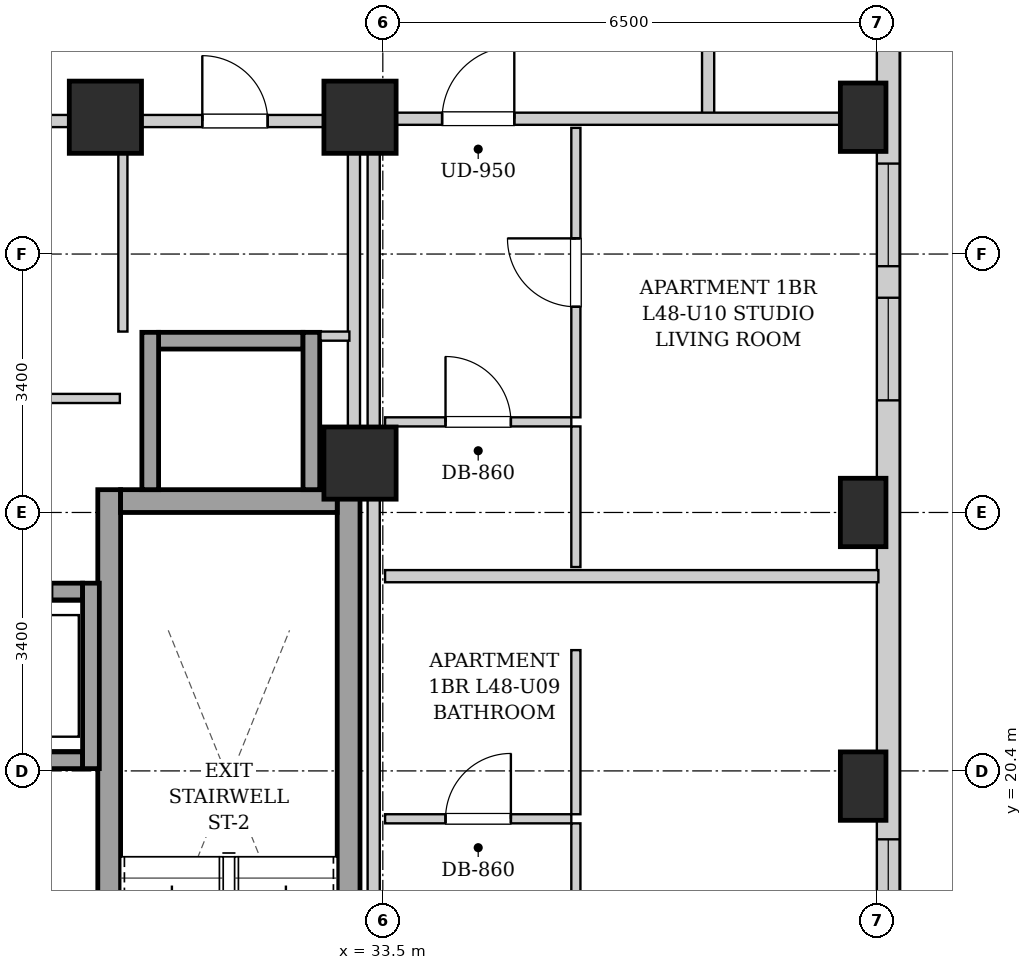
"""IFC4 building model, lengths in metres.
Left out: names, types, materials, properties, quantities, classifications, styles, units other than length and angle.
Written with IfcOpenShell. Run it as: python <this file> out.ifc"""

import sys

from ifc_helpers import new_model, si_unit, direction, frame, frame_2d, origin, origin_2d, place, context, subcontext, project, spatial, rectangle, extrude, element, fill, save


model = new_model("IFC4")
c1 = context("Model", 3, precision=1e-05, world=origin(), true_north=direction((0.0, 1.0)))
c2 = subcontext(c1, "Body", "Model", "MODEL_VIEW")
j1 = project(units=[si_unit("LENGTHUNIT", "METRE"), si_unit("PLANEANGLEUNIT", "RADIAN")], contexts=[c1])
p1 = place(None, origin())
s1 = spatial("IfcSite", under=j1, at=p1, CompositionType="ELEMENT")
p2 = place(p1, origin())
s2 = spatial("IfcBuilding", under=s1, at=p2, CompositionType="ELEMENT")
p3 = place(p2, frame((0.0, 0.0, 166.65)))
s3 = spatial("IfcBuildingStorey", under=s2, at=p3, CompositionType="ELEMENT", Elevation=166.65)
for number, where, z_axis, x_axis in (
    (1, (39.82, 20.2, 0.0), (0.0, 0.0, 1.0), (1.0, 0.0, 0.0)),
    (2, (39.82, 23.8, 0.0), (0.0, 0.0, 1.0), (1.0, 0.0, 0.0)),
    (3, (39.82, 29.0, 0.0), (0.0, 0.0, 1.0), (1.0, 0.0, 0.0)),
):
    element("IfcColumn", number, at=place(p3, frame(where, z_axis=z_axis, x_axis=x_axis)), inside=s3, PredefinedType="COLUMN", context=c2, shape_type="SweptSolid", body=[
        extrude(rectangle(XDim=0.6, YDim=0.9, at=origin_2d()), origin(), (0.0, 0.0, 1.0), 3.25),
    ])
for number, where, z_axis, x_axis in (
    (4, (29.85, 29.0, 0.0), (0.0, 0.0, 1.0), (1.0, 0.0, 0.0)),
    (5, (33.2, 29.0, 0.0), (0.0, 0.0, 1.0), (1.0, 0.0, 0.0)),
    (6, (33.2, 24.45, 0.0), (0.0, 0.0, 1.0), (1.0, 0.0, 0.0)),
):
    element("IfcColumn", number, at=place(p3, frame(where, z_axis=z_axis, x_axis=x_axis)), inside=s3, PredefinedType="COLUMN", context=c2, shape_type="SweptSolid", body=[
        extrude(rectangle(XDim=0.95, YDim=0.95, at=origin_2d()), origin(), (0.0, 0.0, 1.0), 3.25),
    ])
p4 = place(p3, frame((40.15, 40.8, 0.0), z_axis=(0.0, 0.0, 1.0), x_axis=(0.0, -1.0, 0.0)))
e7 = element("IfcWall", 7, at=p4, inside=s3, PredefinedType="SOLIDWALL", context=c2, shape_type="SweptSolid", body=[
    extrude(rectangle(XDim=34.5, YDim=0.3, at=frame_2d((17.25, 0.0))), origin(), (0.0, 0.0, 1.0), 2.93),
])
p5 = place(p4, frame((31.725, 0.0, 0.55)))
e8 = element("IfcOpeningElement", 8, at=p5, cuts=e7, PredefinedType="OPENING", context=c2, shape_type="SweptSolid", body=[
    extrude(rectangle(XDim=1.35, YDim=1.2, at=frame_2d((0.675, 0.6))), frame((0.0, 0.16, 0.0), z_axis=(0.0, -1.0, 0.0), x_axis=(1.0, 0.0, 0.0)), (0.0, 0.0, 1.0), 0.32),
])
p6 = place(p4, frame((3.0, 0.0, 0.55)))
e9 = element("IfcOpeningElement", 9, at=p6, cuts=e7, PredefinedType="OPENING", context=c2, shape_type="SweptSolid", body=[
    extrude(rectangle(XDim=1.35, YDim=1.2, at=frame_2d((0.675, 0.6))), frame((0.0, 0.16, 0.0), z_axis=(0.0, -1.0, 0.0), x_axis=(1.0, 0.0, 0.0)), (0.0, 0.0, 1.0), 0.32),
])
p7 = place(p4, frame((1.085, 0.0, 0.55)))
e10 = element("IfcOpeningElement", 10, at=p7, cuts=e7, PredefinedType="OPENING", context=c2, shape_type="SweptSolid", body=[
    extrude(rectangle(XDim=1.35, YDim=1.2, at=frame_2d((0.675, 0.6))), frame((0.0, 0.16, 0.0), z_axis=(0.0, -1.0, 0.0), x_axis=(1.0, 0.0, 0.0)), (0.0, 0.0, 1.0), 0.32),
])
p8 = place(p4, frame((21.3, 0.0, 0.55)))
e11 = element("IfcOpeningElement", 11, at=p8, cuts=e7, PredefinedType="OPENING", context=c2, shape_type="SweptSolid", body=[
    extrude(rectangle(XDim=1.35, YDim=1.2, at=frame_2d((0.675, 0.6))), frame((0.0, 0.16, 0.0), z_axis=(0.0, -1.0, 0.0), x_axis=(1.0, 0.0, 0.0)), (0.0, 0.0, 1.0), 0.32),
])
p9 = place(p4, frame((22.91, 0.0, 0.55)))
e12 = element("IfcOpeningElement", 12, at=p9, cuts=e7, PredefinedType="OPENING", context=c2, shape_type="SweptSolid", body=[
    extrude(rectangle(XDim=1.35, YDim=1.2, at=frame_2d((0.675, 0.6))), frame((0.0, 0.16, 0.0), z_axis=(0.0, -1.0, 0.0), x_axis=(1.0, 0.0, 0.0)), (0.0, 0.0, 1.0), 0.32),
])
p10 = place(p4, frame((14.175, 0.0, 0.55)))
e13 = element("IfcOpeningElement", 13, at=p10, cuts=e7, PredefinedType="OPENING", context=c2, shape_type="SweptSolid", body=[
    extrude(rectangle(XDim=1.35, YDim=1.2, at=frame_2d((0.675, 0.6))), frame((0.0, 0.16, 0.0), z_axis=(0.0, -1.0, 0.0), x_axis=(1.0, 0.0, 0.0)), (0.0, 0.0, 1.0), 0.32),
])
p11 = place(p4, frame((12.41, 0.0, 0.55)))
e14 = element("IfcOpeningElement", 14, at=p11, cuts=e7, PredefinedType="OPENING", context=c2, shape_type="SweptSolid", body=[
    extrude(rectangle(XDim=1.35, YDim=1.2, at=frame_2d((0.675, 0.6))), frame((0.0, 0.16, 0.0), z_axis=(0.0, -1.0, 0.0), x_axis=(1.0, 0.0, 0.0)), (0.0, 0.0, 1.0), 0.32),
])
for number, where, z_axis, x_axis in (
    (15, (29.9, 15.1, 0.0), (0.0, 0.0, 1.0), (0.0, 1.0, 0.0)),
    (16, (33.05, 15.1, 0.0), (0.0, 0.0, 1.0), (0.0, 1.0, 0.0)),
):
    element("IfcWall", number, at=place(p3, frame(where, z_axis=z_axis, x_axis=x_axis)), inside=s3, PredefinedType="SHEAR", context=c2, shape_type="SweptSolid", body=[
        extrude(rectangle(XDim=9.0, YDim=0.3, at=frame_2d((4.5, 0.0))), origin(), (0.0, 0.0, 1.0), 2.93),
    ])
p12 = place(p3, frame((30.05, 23.95, 0.0), z_axis=(0.0, 0.0, 1.0), x_axis=(1.0, 0.0, 0.0)))
e17 = element("IfcWall", 17, at=p12, inside=s3, PredefinedType="SHEAR", context=c2, shape_type="SweptSolid", body=[
    extrude(rectangle(XDim=2.85, YDim=0.3, at=frame_2d((1.425, 0.0))), origin(), (0.0, 0.0, 1.0), 2.93),
])
p13 = place(p3, frame((27.65, 20.54, 0.0), z_axis=(0.0, 0.0, 1.0), x_axis=(1.0, 0.0, 0.0)))
e18 = element("IfcWall", 18, at=p13, inside=s3, PredefinedType="SHEAR", context=c2, shape_type="SweptSolid", body=[
    extrude(rectangle(XDim=1.9, YDim=0.22, at=frame_2d((0.95, 0.0))), origin(), (0.0, 0.0, 1.0), 2.93),
])
p14 = place(p3, frame((27.65, 22.76, 0.0), z_axis=(0.0, 0.0, 1.0), x_axis=(1.0, 0.0, 0.0)))
e19 = element("IfcWall", 19, at=p14, inside=s3, PredefinedType="SHEAR", context=c2, shape_type="SweptSolid", body=[
    extrude(rectangle(XDim=1.9, YDim=0.22, at=frame_2d((0.95, 0.0))), origin(), (0.0, 0.0, 1.0), 2.93),
])
p15 = place(p14, frame((0.4, 0.0, 0.0)))
e20 = element("IfcOpeningElement", 20, at=p15, cuts=e19, PredefinedType="OPENING", context=c2, shape_type="SweptSolid", body=[
    extrude(rectangle(XDim=1.1, YDim=2.15, at=frame_2d((0.55, 1.075))), frame((0.0, 0.12, 0.0), z_axis=(0.0, -1.0, 0.0), x_axis=(1.0, 0.0, 0.0)), (0.0, 0.0, 1.0), 0.24),
])
p16 = place(p3, frame((29.66, 20.43, 0.0), z_axis=(0.0, 0.0, 1.0), x_axis=(0.0, 1.0, 0.0)))
e21 = element("IfcWall", 21, at=p16, inside=s3, PredefinedType="SHEAR", context=c2, shape_type="SweptSolid", body=[
    extrude(rectangle(XDim=2.44, YDim=0.22, at=frame_2d((1.22, 0.0))), origin(), (0.0, 0.0, 1.0), 2.93),
])
p17 = place(p3, frame((30.55, 26.06, 0.0), z_axis=(0.0, 0.0, 1.0), x_axis=(1.0, 0.0, 0.0)))
e22 = element("IfcWall", 22, at=p17, inside=s3, PredefinedType="SHEAR", context=c2, shape_type="SweptSolid", body=[
    extrude(rectangle(XDim=1.9, YDim=0.22, at=frame_2d((0.95, 0.0))), origin(), (0.0, 0.0, 1.0), 2.93),
])
for number, where, z_axis, x_axis in (
    (23, (30.44, 24.1, 0.0), (0.0, 0.0, 1.0), (0.0, 1.0, 0.0)),
    (24, (32.56, 24.1, 0.0), (0.0, 0.0, 1.0), (0.0, 1.0, 0.0)),
):
    element("IfcWall", number, at=place(p3, frame(where, z_axis=z_axis, x_axis=x_axis)), inside=s3, PredefinedType="SHEAR", context=c2, shape_type="SweptSolid", body=[
        extrude(rectangle(XDim=2.07, YDim=0.22, at=frame_2d((1.035, 0.0))), origin(), (0.0, 0.0, 1.0), 2.93),
    ])
p18 = place(p3, frame((33.12, 24.12, 0.0), z_axis=(0.0, 0.0, 1.0), x_axis=(0.0, 1.0, 0.0)))
e25 = element("IfcWall", 25, at=p18, inside=s3, PredefinedType="PARTITIONING", context=c2, shape_type="SweptSolid", body=[
    extrude(rectangle(XDim=4.76, YDim=0.16, at=frame_2d((2.38, 0.0))), origin(), (0.0, 0.0, 1.0), 2.265),
])
p19 = place(p3, frame((30.08, 26.18, 0.0), z_axis=(0.0, 0.0, 1.0), x_axis=(0.0, 1.0, 0.0)))
e26 = element("IfcWall", 26, at=p19, inside=s3, PredefinedType="PARTITIONING", context=c2, shape_type="SweptSolid", body=[
    extrude(rectangle(XDim=2.68, YDim=0.12, at=frame_2d((1.34, 0.0))), origin(), (0.0, 0.0, 1.0), 2.93),
])
p20 = place(p3, frame((32.68, 26.12, 0.0), z_axis=(0.0, 0.0, 1.0), x_axis=(1.0, 0.0, 0.0)))
e27 = element("IfcWall", 27, at=p20, inside=s3, PredefinedType="PARTITIONING", context=c2, shape_type="SweptSolid", body=[
    extrude(rectangle(XDim=0.38, YDim=0.12, at=frame_2d((0.19, 0.0))), origin(), (0.0, 0.0, 1.0), 2.93),
])
p21 = place(p3, frame((30.08, 28.95, 0.0), z_axis=(0.0, 0.0, 1.0), x_axis=(1.0, 0.0, 0.0)))
e28 = element("IfcWall", 28, at=p21, inside=s3, PredefinedType="PARTITIONING", context=c2, shape_type="SweptSolid", body=[
    extrude(rectangle(XDim=2.96, YDim=0.16, at=frame_2d((1.48, 0.0))), origin(), (0.0, 0.0, 1.0), 2.93),
])
p22 = place(p21, frame((1.045, 0.0, 0.0)))
e29 = element("IfcOpeningElement", 29, at=p22, cuts=e28, PredefinedType="OPENING", context=c2, shape_type="SweptSolid", body=[
    extrude(rectangle(XDim=0.86, YDim=2.05, at=frame_2d((0.43, 1.025))), frame((0.0, 0.09, 0.0), z_axis=(0.0, -1.0, 0.0), x_axis=(1.0, 0.0, 0.0)), (0.0, 0.0, 1.0), 0.18),
])
p23 = place(p3, frame((25.72, 28.95, 0.0), z_axis=(0.0, 0.0, 1.0), x_axis=(1.0, 0.0, 0.0)))
e30 = element("IfcWall", 30, at=p23, inside=s3, PredefinedType="PARTITIONING", context=c2, shape_type="SweptSolid", body=[
    extrude(rectangle(XDim=4.32, YDim=0.16, at=frame_2d((2.16, 0.0))), origin(), (0.0, 0.0, 1.0), 2.382),
])
p24 = place(p3, frame((25.72, 25.3, 0.0), z_axis=(0.0, 0.0, 1.0), x_axis=(1.0, 0.0, 0.0)))
e31 = element("IfcWall", 31, at=p24, inside=s3, PredefinedType="PARTITIONING", context=c2, shape_type="SweptSolid", body=[
    extrude(rectangle(XDim=4.32, YDim=0.12, at=frame_2d((2.16, 0.0))), origin(), (0.0, 0.0, 1.0), 2.93),
])
p25 = place(p24, frame((1.65, 0.0, 0.0)))
e32 = element("IfcOpeningElement", 32, at=p25, cuts=e31, PredefinedType="OPENING", context=c2, shape_type="SweptSolid", body=[
    extrude(rectangle(XDim=0.9, YDim=2.05, at=frame_2d((0.45, 1.025))), frame((0.0, 0.07, 0.0), z_axis=(0.0, -1.0, 0.0), x_axis=(1.0, 0.0, 0.0)), (0.0, 0.0, 1.0), 0.14),
])
p26 = place(p3, frame((37.78, 28.98, 0.0), z_axis=(0.0, 0.0, 1.0), x_axis=(0.0, 1.0, 0.0)))
e33 = element("IfcWall", 33, at=p26, inside=s3, PredefinedType="PARTITIONING", context=c2, shape_type="SweptSolid", body=[
    extrude(rectangle(XDim=1.74, YDim=0.16, at=frame_2d((0.87, 0.0))), origin(), (0.0, 0.0, 1.0), 2.93),
])
p27 = place(p3, frame((33.53, 22.962, 0.0), z_axis=(0.0, 0.0, 1.0), x_axis=(1.0, 0.0, 0.0)))
e34 = element("IfcWall", 34, at=p27, inside=s3, PredefinedType="PARTITIONING", context=c2, shape_type="SweptSolid", body=[
    extrude(rectangle(XDim=6.49, YDim=0.16, at=frame_2d((3.245, 0.0))), origin(), (0.0, 0.0, 1.0), 2.93),
])
p28 = place(p3, frame((33.53, 19.77, 0.0), z_axis=(0.0, 0.0, 1.0), x_axis=(1.0, 0.0, 0.0)))
e35 = element("IfcWall", 35, at=p28, inside=s3, PredefinedType="PARTITIONING", context=c2, shape_type="SweptSolid", body=[
    extrude(rectangle(XDim=2.45, YDim=0.12, at=frame_2d((1.225, 0.0))), origin(), (0.0, 0.0, 1.0), 2.93),
])
p29 = place(p28, frame((0.795, 0.0, 0.0)))
e36 = element("IfcOpeningElement", 36, at=p29, cuts=e35, PredefinedType="OPENING", context=c2, shape_type="SweptSolid", body=[
    extrude(rectangle(XDim=0.86, YDim=2.05, at=frame_2d((0.43, 1.025))), frame((0.0, 0.07, 0.0), z_axis=(0.0, -1.0, 0.0), x_axis=(1.0, 0.0, 0.0)), (0.0, 0.0, 1.0), 0.14),
])
p30 = place(p3, frame((36.04, 19.83, 0.0), z_axis=(0.0, 0.0, 1.0), x_axis=(0.0, 1.0, 0.0)))
e37 = element("IfcWall", 37, at=p30, inside=s3, PredefinedType="PARTITIONING", context=c2, shape_type="SweptSolid", body=[
    extrude(rectangle(XDim=2.159, YDim=0.12, at=frame_2d((1.08, 0.0))), origin(), (0.0, 0.0, 1.0), 2.93),
])
p31 = place(p3, frame((36.04, 15.21, 0.0), z_axis=(0.0, 0.0, 1.0), x_axis=(0.0, 1.0, 0.0)))
e38 = element("IfcWall", 38, at=p31, inside=s3, PredefinedType="PARTITIONING", context=c2, shape_type="SweptSolid", body=[
    extrude(rectangle(XDim=4.5, YDim=0.12, at=frame_2d((2.25, 0.0))), origin(), (0.0, 0.0, 1.0), 2.93),
])
p32 = place(p31, frame((1.8, 0.0, 0.0)))
e39 = element("IfcOpeningElement", 39, at=p32, cuts=e38, PredefinedType="OPENING", context=c2, shape_type="SweptSolid", body=[
    extrude(rectangle(XDim=0.9, YDim=2.05, at=frame_2d((0.45, 1.025))), frame((0.0, 0.07, 0.0), z_axis=(0.0, -1.0, 0.0), x_axis=(1.0, 0.0, 0.0)), (0.0, 0.0, 1.0), 0.14),
])
p33 = place(p3, frame((33.38, 28.98, 0.0), z_axis=(0.0, 0.0, 1.0), x_axis=(1.0, 0.0, 0.0)))
e40 = element("IfcWall", 40, at=p33, inside=s3, PredefinedType="PARTITIONING", context=c2, shape_type="SweptSolid", body=[
    extrude(rectangle(XDim=6.64, YDim=0.16, at=frame_2d((3.32, 0.0))), origin(), (0.0, 0.0, 1.0), 2.382),
])
p34 = place(p33, frame((0.9, 0.0, 0.0)))
e41 = element("IfcOpeningElement", 41, at=p34, cuts=e40, PredefinedType="OPENING", context=c2, shape_type="SweptSolid", body=[
    extrude(rectangle(XDim=0.95, YDim=2.1, at=frame_2d((0.475, 1.05))), frame((0.0, 0.09, 0.0), z_axis=(0.0, -1.0, 0.0), x_axis=(1.0, 0.0, 0.0)), (0.0, 0.0, 1.0), 0.18),
])
p35 = place(p3, frame((33.53, 24.992, 0.0), z_axis=(0.0, 0.0, 1.0), x_axis=(1.0, 0.0, 0.0)))
e42 = element("IfcWall", 42, at=p35, inside=s3, PredefinedType="PARTITIONING", context=c2, shape_type="SweptSolid", body=[
    extrude(rectangle(XDim=2.45, YDim=0.12, at=frame_2d((1.225, 0.0))), origin(), (0.0, 0.0, 1.0), 2.93),
])
p36 = place(p35, frame((0.795, 0.0, 0.0)))
e43 = element("IfcOpeningElement", 43, at=p36, cuts=e42, PredefinedType="OPENING", context=c2, shape_type="SweptSolid", body=[
    extrude(rectangle(XDim=0.86, YDim=2.05, at=frame_2d((0.43, 1.025))), frame((0.0, 0.07, 0.0), z_axis=(0.0, -1.0, 0.0), x_axis=(1.0, 0.0, 0.0)), (0.0, 0.0, 1.0), 0.14),
])
p37 = place(p3, frame((36.04, 23.082, 0.0), z_axis=(0.0, 0.0, 1.0), x_axis=(0.0, 1.0, 0.0)))
e44 = element("IfcWall", 44, at=p37, inside=s3, PredefinedType="PARTITIONING", context=c2, shape_type="SweptSolid", body=[
    extrude(rectangle(XDim=1.85, YDim=0.12, at=frame_2d((0.925, 0.0))), origin(), (0.0, 0.0, 1.0), 2.93),
])
p38 = place(p3, frame((36.04, 25.052, 0.0), z_axis=(0.0, 0.0, 1.0), x_axis=(0.0, 1.0, 0.0)))
e45 = element("IfcWall", 45, at=p38, inside=s3, PredefinedType="PARTITIONING", context=c2, shape_type="SweptSolid", body=[
    extrude(rectangle(XDim=3.808, YDim=0.12, at=frame_2d((1.904, 0.0))), origin(), (0.0, 0.0, 1.0), 2.93),
])
p39 = place(p38, frame((1.454, 0.0, 0.0)))
e46 = element("IfcOpeningElement", 46, at=p39, cuts=e45, PredefinedType="OPENING", context=c2, shape_type="SweptSolid", body=[
    extrude(rectangle(XDim=0.9, YDim=2.05, at=frame_2d((0.45, 1.025))), frame((0.0, 0.07, 0.0), z_axis=(0.0, -1.0, 0.0), x_axis=(1.0, 0.0, 0.0)), (0.0, 0.0, 1.0), 0.14),
])
p40 = place(p3, frame((33.38, 15.02, 0.0), z_axis=(0.0, 0.0, 1.0), x_axis=(0.0, 1.0, 0.0)))
e47 = element("IfcWall", 47, at=p40, inside=s3, PredefinedType="PARTITIONING", context=c2, shape_type="SweptSolid", body=[
    extrude(rectangle(XDim=13.98, YDim=0.16, at=frame_2d((6.99, 0.0))), origin(), (0.0, 0.0, 1.0), 2.265),
])
p41 = place(p22, origin())
e48 = element("IfcDoor", 48, at=p41, inside=s3, OperationType="SINGLE_SWING_LEFT", PredefinedType="DOOR", context=c2, shape_type="SweptSolid", body=[
    extrude(rectangle(XDim=0.86, YDim=2.05, at=frame_2d((0.43, 1.025))), frame((0.0, 0.025, 0.0), z_axis=(0.0, -1.0, 0.0), x_axis=(1.0, 0.0, 0.0)), (0.0, 0.0, 1.0), 0.05),
])
fill(e29, e48)
p42 = place(p29, origin())
e49 = element("IfcDoor", 49, at=p42, inside=s3, OperationType="SINGLE_SWING_RIGHT", PredefinedType="DOOR", context=c2, shape_type="SweptSolid", body=[
    extrude(rectangle(XDim=0.86, YDim=2.05, at=frame_2d((0.43, 1.025))), frame((0.0, 0.025, 0.0), z_axis=(0.0, -1.0, 0.0), x_axis=(1.0, 0.0, 0.0)), (0.0, 0.0, 1.0), 0.05),
])
fill(e36, e49)
p43 = place(p34, origin())
e50 = element("IfcDoor", 50, at=p43, inside=s3, OperationType="SINGLE_SWING_RIGHT", PredefinedType="DOOR", context=c2, shape_type="SweptSolid", body=[
    extrude(rectangle(XDim=0.95, YDim=2.1, at=frame_2d((0.475, 1.05))), frame((0.0, 0.025, 0.0), z_axis=(0.0, -1.0, 0.0), x_axis=(1.0, 0.0, 0.0)), (0.0, 0.0, 1.0), 0.05),
])
fill(e41, e50)
p44 = place(p36, origin())
e51 = element("IfcDoor", 51, at=p44, inside=s3, OperationType="SINGLE_SWING_LEFT", PredefinedType="DOOR", context=c2, shape_type="SweptSolid", body=[
    extrude(rectangle(XDim=0.86, YDim=2.05, at=frame_2d((0.43, 1.025))), frame((0.0, 0.025, 0.0), z_axis=(0.0, -1.0, 0.0), x_axis=(1.0, 0.0, 0.0)), (0.0, 0.0, 1.0), 0.05),
])
fill(e43, e51)
p45 = place(p39, origin())
e52 = element("IfcDoor", 52, at=p45, inside=s3, OperationType="SINGLE_SWING_RIGHT", PredefinedType="DOOR", context=c2, shape_type="SweptSolid", body=[
    extrude(rectangle(XDim=0.9, YDim=2.05, at=frame_2d((0.45, 1.025))), frame((0.0, 0.025, 0.0), z_axis=(0.0, -1.0, 0.0), x_axis=(1.0, 0.0, 0.0)), (0.0, 0.0, 1.0), 0.05),
])
fill(e46, e52)
p46 = place(p8, origin())
e53 = element("IfcWindow", 53, at=p46, inside=s3, PartitioningType="SINGLE_PANEL", PredefinedType="WINDOW", context=c2, shape_type="SweptSolid", body=[
    extrude(rectangle(XDim=1.35, YDim=1.2, at=frame_2d((0.675, 0.6))), frame((0.0, 0.03, 0.0), z_axis=(0.0, -1.0, 0.0), x_axis=(1.0, 0.0, 0.0)), (0.0, 0.0, 1.0), 0.06),
])
fill(e11, e53)
p47 = place(p10, origin())
e54 = element("IfcWindow", 54, at=p47, inside=s3, PartitioningType="SINGLE_PANEL", PredefinedType="WINDOW", context=c2, shape_type="SweptSolid", body=[
    extrude(rectangle(XDim=1.35, YDim=1.2, at=frame_2d((0.675, 0.6))), frame((0.0, 0.03, 0.0), z_axis=(0.0, -1.0, 0.0), x_axis=(1.0, 0.0, 0.0)), (0.0, 0.0, 1.0), 0.06),
])
fill(e13, e54)
p48 = place(p11, origin())
e55 = element("IfcWindow", 55, at=p48, inside=s3, PartitioningType="SINGLE_PANEL", PredefinedType="WINDOW", context=c2, shape_type="SweptSolid", body=[
    extrude(rectangle(XDim=1.35, YDim=1.2, at=frame_2d((0.675, 0.6))), frame((0.0, 0.03, 0.0), z_axis=(0.0, -1.0, 0.0), x_axis=(1.0, 0.0, 0.0)), (0.0, 0.0, 1.0), 0.06),
])
fill(e14, e55)
save(model, sys.argv[1])
